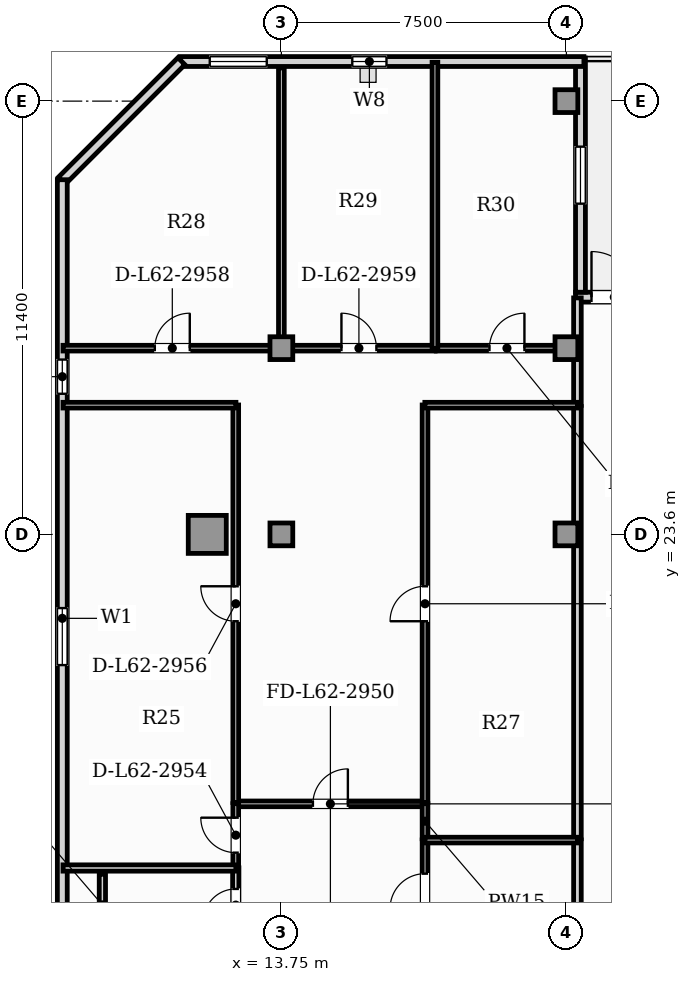
"""IFC4 building model, lengths in metres.
Left out: names, types, materials, properties, quantities, classifications, styles, units other than length and angle.
Written with IfcOpenShell. Run it as: python <this file> out.ifc"""

import sys

from ifc_helpers import new_model, si_unit, direction, frame, frame_2d, origin, origin_2d, place, context, subcontext, project, spatial, rectangle, hollow_rectangle, extrude, element, fill, save


model = new_model("IFC4")
c1 = context("Model", 3, precision=1e-05, world=origin(), true_north=direction((0.0, 1.0)))
c2 = subcontext(c1, "Body", "Model", "MODEL_VIEW")
j1 = project(units=[si_unit("LENGTHUNIT", "METRE"), si_unit("PLANEANGLEUNIT", "RADIAN")], contexts=[c1])
p1 = place(None, origin())
s1 = spatial("IfcSite", under=j1, at=p1, CompositionType="ELEMENT")
p2 = place(p1, origin())
s2 = spatial("IfcBuilding", under=s1, at=p2, CompositionType="ELEMENT")
p3 = place(p2, frame((0.0, 0.0, 251.7)))
s3 = spatial("IfcBuildingStorey", under=s2, at=p3, CompositionType="ELEMENT", Elevation=251.7)
p4 = place(p3, frame((11.8, 23.6, 0.0), z_axis=(0.0, 0.0, 1.0), x_axis=(1.0, 0.0, 0.0)))
e1 = element("IfcColumn", 1, at=p4, inside=s3, PredefinedType="USERDEFINED", context=c2, shape_type="SweptSolid", body=[
    extrude(hollow_rectangle(XDim=1.0, YDim=1.0, WallThickness=0.06, at=origin_2d()), origin(), (0.0, 0.0, 1.0), 5.05),
])
for number, where, z_axis, x_axis in (
    (2, (13.75, 23.6, 0.0), (0.0, 0.0, 1.0), (1.0, 0.0, 0.0)),
    (3, (21.25, 23.6, 0.0), (0.0, 0.0, 1.0), (1.0, 0.0, 0.0)),
    (4, (13.75, 28.5, 0.0), (0.0, 0.0, 1.0), (1.0, 0.0, 0.0)),
    (5, (21.25, 28.5, 0.0), (0.0, 0.0, 1.0), (1.0, 0.0, 0.0)),
    (6, (21.25, 35.0, 0.0), (0.0, 0.0, 1.0), (1.0, 0.0, 0.0)),
):
    element("IfcColumn", number, at=place(p3, frame(where, z_axis=z_axis, x_axis=x_axis)), inside=s3, PredefinedType="COLUMN", context=c2, shape_type="SweptSolid", body=[
        extrude(rectangle(XDim=0.6, YDim=0.6, at=origin_2d()), origin(), (0.0, 0.0, 1.0), 5.05),
    ])
p5 = place(p3, frame((21.49, 29.842, 0.0), z_axis=(0.0, 0.0, 1.0), x_axis=(1.0, 0.0, 0.0)))
e7 = element("IfcWall", 7, at=p5, inside=s3, PredefinedType="SOLIDWALL", context=c2, shape_type="SweptSolid", body=[
    extrude(rectangle(XDim=1.76, YDim=0.26, at=frame_2d((0.88, 0.0))), origin(), (0.0, 0.0, 1.0), 4.85),
])
p6 = place(p5, frame((0.42, 0.0, 0.0)))
e8 = element("IfcOpeningElement", 8, at=p6, cuts=e7, PredefinedType="OPENING", context=c2, shape_type="SweptSolid", body=[
    extrude(rectangle(XDim=1.2, YDim=2.2, at=frame_2d((0.6, 1.1))), frame((0.0, 0.14, 0.0), z_axis=(0.0, -1.0, 0.0), x_axis=(1.0, 0.0, 0.0)), (0.0, 0.0, 1.0), 0.28),
])
p7 = place(p3, frame((21.62, 29.972, 0.0), z_axis=(0.0, 0.0, 1.0), x_axis=(0.0, 1.0, 0.0)))
e9 = element("IfcWall", 9, at=p7, inside=s3, PredefinedType="SOLIDWALL", context=c2, shape_type="SweptSolid", body=[
    extrude(rectangle(XDim=6.16, YDim=0.26, at=frame_2d((3.08, 0.0))), origin(), (0.0, 0.0, 1.0), 4.85),
])
p8 = place(p7, frame((2.33, 0.0, 0.9)))
e10 = element("IfcOpeningElement", 10, at=p8, cuts=e9, PredefinedType="OPENING", context=c2, shape_type="SweptSolid", body=[
    extrude(rectangle(XDim=1.5, YDim=1.95, at=frame_2d((0.75, 0.975))), frame((0.0, 0.14, 0.0), z_axis=(0.0, -1.0, 0.0), x_axis=(1.0, 0.0, 0.0)), (0.0, 0.0, 1.0), 0.28),
])
p9 = place(p3, frame((21.71, 36.042, 0.0), z_axis=(0.0, 0.0, 1.0), x_axis=(-1.0, 0.0, 0.0)))
e11 = element("IfcWall", 11, at=p9, inside=s3, PredefinedType="SOLIDWALL", context=c2, shape_type="SweptSolid", body=[
    extrude(rectangle(XDim=10.615, YDim=0.26, at=frame_2d((5.307, 0.0))), origin(), (0.0, 0.0, 1.0), 4.85),
])
p10 = place(p9, frame((8.344, 0.0, 0.9)))
e12 = element("IfcOpeningElement", 12, at=p10, cuts=e11, PredefinedType="OPENING", context=c2, shape_type="SweptSolid", body=[
    extrude(rectangle(XDim=1.5, YDim=1.95, at=frame_2d((0.75, 0.975))), frame((0.0, 0.14, 0.0), z_axis=(0.0, -1.0, 0.0), x_axis=(1.0, 0.0, 0.0)), (0.0, 0.0, 1.0), 0.28),
])
p11 = place(p9, frame((5.194, 0.0, 0.9)))
e13 = element("IfcOpeningElement", 13, at=p11, cuts=e11, PredefinedType="OPENING", context=c2, shape_type="SweptSolid", body=[
    extrude(rectangle(XDim=0.9, YDim=1.4, at=frame_2d((0.45, 0.7))), frame((0.0, 0.14, 0.0), z_axis=(0.0, -1.0, 0.0), x_axis=(1.0, 0.0, 0.0)), (0.0, 0.0, 1.0), 0.28),
])
p12 = place(p3, frame((11.119, 36.052, 0.0), z_axis=(0.0, 0.0, 1.0), x_axis=(-0.707106781187, -0.707106781187, 0.0)))
e14 = element("IfcWall", 14, at=p12, inside=s3, PredefinedType="SOLIDWALL", context=c2, shape_type="SweptSolid", body=[
    extrude(rectangle(XDim=4.446, YDim=0.26, at=frame_2d((2.223, 0.0))), origin(), (0.0, 0.0, 1.0), 4.85),
])
p13 = place(p3, frame((7.986, 32.932, 0.0), z_axis=(0.0, 0.0, 1.0), x_axis=(0.0, -1.0, 0.0)))
e15 = element("IfcWall", 15, at=p13, inside=s3, PredefinedType="SOLIDWALL", context=c2, shape_type="SweptSolid", body=[
    extrude(rectangle(XDim=29.692, YDim=0.26, at=frame_2d((14.846, 0.0))), origin(), (0.0, 0.0, 1.0), 4.85),
])
p14 = place(p13, frame((23.642, 0.0, 0.85)))
e16 = element("IfcOpeningElement", 16, at=p14, cuts=e15, PredefinedType="OPENING", context=c2, shape_type="SweptSolid", body=[
    extrude(rectangle(XDim=2.4, YDim=2.0, at=frame_2d((1.2, 1.0))), frame((0.0, 0.14, 0.0), z_axis=(0.0, -1.0, 0.0), x_axis=(1.0, 0.0, 0.0)), (0.0, 0.0, 1.0), 0.28),
])
p15 = place(p13, frame((4.732, 0.0, 0.95)))
e17 = element("IfcOpeningElement", 17, at=p15, cuts=e15, PredefinedType="OPENING", context=c2, shape_type="SweptSolid", body=[
    extrude(rectangle(XDim=0.9, YDim=1.5, at=frame_2d((0.45, 0.75))), frame((0.0, 0.14, 0.0), z_axis=(0.0, -1.0, 0.0), x_axis=(1.0, 0.0, 0.0)), (0.0, 0.0, 1.0), 0.28),
])
p16 = place(p13, frame((11.271, 0.0, 0.9)))
e18 = element("IfcOpeningElement", 18, at=p16, cuts=e15, PredefinedType="OPENING", context=c2, shape_type="SweptSolid", body=[
    extrude(rectangle(XDim=1.5, YDim=1.95, at=frame_2d((0.75, 0.975))), frame((0.0, 0.14, 0.0), z_axis=(0.0, -1.0, 0.0), x_axis=(1.0, 0.0, 0.0)), (0.0, 0.0, 1.0), 0.28),
])
p17 = place(p3, frame((21.54, 26.995, 0.0), z_axis=(0.0, 0.0, 1.0), x_axis=(0.0, 1.0, 0.0)))
e19 = element("IfcWall", 19, at=p17, inside=s3, PredefinedType="PARTITIONING", context=c2, shape_type="SweptSolid", body=[
    extrude(rectangle(XDim=2.827, YDim=0.2, at=frame_2d((1.414, 0.0))), origin(), (0.0, 0.0, 1.0), 4.85),
])
p18 = place(p3, frame((21.54, 12.865, 0.0), z_axis=(0.0, 0.0, 1.0), x_axis=(0.0, 1.0, 0.0)))
e20 = element("IfcWall", 20, at=p18, inside=s3, PredefinedType="PARTITIONING", context=c2, shape_type="SweptSolid", body=[
    extrude(rectangle(XDim=2.697, YDim=0.2, at=frame_2d((1.348, 0.0))), origin(), (0.0, 0.0, 1.0), 4.85),
])
p19 = place(p3, frame((21.54, 15.592, 0.0), z_axis=(0.0, 0.0, 1.0), x_axis=(0.0, 1.0, 0.0)))
e21 = element("IfcWall", 21, at=p19, inside=s3, PredefinedType="PARTITIONING", context=c2, shape_type="SweptSolid", body=[
    extrude(rectangle(XDim=11.374, YDim=0.2, at=frame_2d((5.687, 0.0))), origin(), (0.0, 0.0, 1.0), 4.85),
])
p20 = place(p3, frame((12.545, 16.51, 0.0), z_axis=(0.0, 0.0, 1.0), x_axis=(1.0, 0.0, 0.0)))
e22 = element("IfcWall", 22, at=p20, inside=s3, PredefinedType="PARTITIONING", context=c2, shape_type="SweptSolid", body=[
    extrude(rectangle(XDim=4.99, YDim=0.15, at=frame_2d((2.495, 0.0))), origin(), (0.0, 0.0, 1.0), 4.85),
])
p21 = place(p20, frame((2.035, 0.0, 0.0)))
e23 = element("IfcOpeningElement", 23, at=p21, cuts=e22, PredefinedType="OPENING", context=c2, shape_type="SweptSolid", body=[
    extrude(rectangle(XDim=0.92, YDim=2.1, at=frame_2d((0.46, 1.05))), frame((0.0, 0.085, 0.0), z_axis=(0.0, -1.0, 0.0), x_axis=(1.0, 0.0, 0.0)), (0.0, 0.0, 1.0), 0.17),
])
p22 = place(p3, frame((12.55, 12.865, 0.0), z_axis=(0.0, 0.0, 1.0), x_axis=(0.0, 1.0, 0.0)))
e24 = element("IfcWall", 24, at=p22, inside=s3, PredefinedType="PLUMBINGWALL", context=c2, shape_type="SweptSolid", body=[
    extrude(rectangle(XDim=1.962, YDim=0.165, at=frame_2d((0.981, 0.0))), origin(), (0.0, 0.0, 1.0), 4.85),
])
p23 = place(p22, frame((0.556, 0.0, 0.0)))
e25 = element("IfcOpeningElement", 25, at=p23, cuts=e24, PredefinedType="OPENING", context=c2, shape_type="SweptSolid", body=[
    extrude(rectangle(XDim=0.85, YDim=2.1, at=frame_2d((0.425, 1.05))), frame((0.0, 0.093, 0.0), z_axis=(0.0, -1.0, 0.0), x_axis=(1.0, 0.0, 0.0)), (0.0, 0.0, 1.0), 0.185),
])
p24 = place(p3, frame((12.55, 14.857, 0.0), z_axis=(0.0, 0.0, 1.0), x_axis=(0.0, 1.0, 0.0)))
e26 = element("IfcWall", 26, at=p24, inside=s3, PredefinedType="PARTITIONING", context=c2, shape_type="SweptSolid", body=[
    extrude(rectangle(XDim=1.658, YDim=0.15, at=frame_2d((0.829, 0.0))), origin(), (0.0, 0.0, 1.0), 4.85),
])
p25 = place(p24, frame((0.369, 0.0, 0.0)))
e27 = element("IfcOpeningElement", 27, at=p25, cuts=e26, PredefinedType="OPENING", context=c2, shape_type="SweptSolid", body=[
    extrude(rectangle(XDim=0.92, YDim=2.1, at=frame_2d((0.46, 1.05))), frame((0.0, 0.085, 0.0), z_axis=(0.0, -1.0, 0.0), x_axis=(1.0, 0.0, 0.0)), (0.0, 0.0, 1.0), 0.17),
])
p26 = place(p3, frame((17.53, 12.865, 0.0), z_axis=(0.0, 0.0, 1.0), x_axis=(0.0, 1.0, 0.0)))
e28 = element("IfcWall", 28, at=p26, inside=s3, PredefinedType="PARTITIONING", context=c2, shape_type="SweptSolid", body=[
    extrude(rectangle(XDim=2.697, YDim=0.15, at=frame_2d((1.348, 0.0))), origin(), (0.0, 0.0, 1.0), 4.85),
])
p27 = place(p26, frame((0.888, 0.0, 0.0)))
e29 = element("IfcOpeningElement", 29, at=p27, cuts=e28, PredefinedType="OPENING", context=c2, shape_type="SweptSolid", body=[
    extrude(rectangle(XDim=0.92, YDim=2.1, at=frame_2d((0.46, 1.05))), frame((0.0, 0.085, 0.0), z_axis=(0.0, -1.0, 0.0), x_axis=(1.0, 0.0, 0.0)), (0.0, 0.0, 1.0), 0.17),
])
p28 = place(p3, frame((17.53, 15.592, 0.0), z_axis=(0.0, 0.0, 1.0), x_axis=(0.0, 1.0, 0.0)))
e30 = element("IfcWall", 30, at=p28, inside=s3, PredefinedType="PARTITIONING", context=c2, shape_type="SweptSolid", body=[
    extrude(rectangle(XDim=0.923, YDim=0.15, at=frame_2d((0.462, 0.0))), origin(), (0.0, 0.0, 1.0), 4.85),
])
p29 = place(p3, frame((12.55, 16.545, 0.0), z_axis=(0.0, 0.0, 1.0), x_axis=(0.0, 1.0, 0.0)))
e31 = element("IfcWall", 31, at=p29, inside=s3, PredefinedType="PARTITIONING", context=c2, shape_type="SweptSolid", body=[
    extrude(rectangle(XDim=10.46, YDim=0.15, at=frame_2d((5.23, 0.0))), origin(), (0.0, 0.0, 1.0), 4.85),
])
p30 = place(p29, frame((4.77, 0.0, 0.0)))
e32 = element("IfcOpeningElement", 32, at=p30, cuts=e31, PredefinedType="OPENING", context=c2, shape_type="SweptSolid", body=[
    extrude(rectangle(XDim=0.92, YDim=2.1, at=frame_2d((0.46, 1.05))), frame((0.0, 0.085, 0.0), z_axis=(0.0, -1.0, 0.0), x_axis=(1.0, 0.0, 0.0)), (0.0, 0.0, 1.0), 0.17),
])
p31 = place(p3, frame((8.005, 27.0, 0.0), z_axis=(0.0, 0.0, 1.0), x_axis=(1.0, 0.0, 0.0)))
e33 = element("IfcWall", 33, at=p31, inside=s3, PredefinedType="PARTITIONING", context=c2, shape_type="SweptSolid", body=[
    extrude(rectangle(XDim=4.55, YDim=0.15, at=frame_2d((2.275, 0.0))), origin(), (0.0, 0.0, 1.0), 4.85),
])
p32 = place(p3, frame((17.53, 16.545, 0.0), z_axis=(0.0, 0.0, 1.0), x_axis=(0.0, 1.0, 0.0)))
e34 = element("IfcWall", 34, at=p32, inside=s3, PredefinedType="PARTITIONING", context=c2, shape_type="SweptSolid", body=[
    extrude(rectangle(XDim=10.46, YDim=0.15, at=frame_2d((5.23, 0.0))), origin(), (0.0, 0.0, 1.0), 4.85),
])
p33 = place(p32, frame((4.77, 0.0, 0.0)))
e35 = element("IfcOpeningElement", 35, at=p33, cuts=e34, PredefinedType="OPENING", context=c2, shape_type="SweptSolid", body=[
    extrude(rectangle(XDim=0.92, YDim=2.1, at=frame_2d((0.46, 1.05))), frame((0.0, 0.085, 0.0), z_axis=(0.0, -1.0, 0.0), x_axis=(1.0, 0.0, 0.0)), (0.0, 0.0, 1.0), 0.17),
])
p34 = place(p3, frame((17.525, 27.0, 0.0), z_axis=(0.0, 0.0, 1.0), x_axis=(1.0, 0.0, 0.0)))
e36 = element("IfcWall", 36, at=p34, inside=s3, PredefinedType="PARTITIONING", context=c2, shape_type="SweptSolid", body=[
    extrude(rectangle(XDim=4.02, YDim=0.15, at=frame_2d((2.01, 0.0))), origin(), (0.0, 0.0, 1.0), 4.85),
])
p35 = place(p3, frame((8.005, 28.5, 0.0), z_axis=(0.0, 0.0, 1.0), x_axis=(1.0, 0.0, 0.0)))
e37 = element("IfcWall", 37, at=p35, inside=s3, PredefinedType="PARTITIONING", context=c2, shape_type="SweptSolid", body=[
    extrude(rectangle(XDim=5.75, YDim=0.15, at=frame_2d((2.875, 0.0))), origin(), (0.0, 0.0, 1.0), 4.85),
])
p36 = place(p35, frame((2.415, 0.0, 0.0)))
e38 = element("IfcOpeningElement", 38, at=p36, cuts=e37, PredefinedType="OPENING", context=c2, shape_type="SweptSolid", body=[
    extrude(rectangle(XDim=0.92, YDim=2.1, at=frame_2d((0.46, 1.05))), frame((0.0, 0.085, 0.0), z_axis=(0.0, -1.0, 0.0), x_axis=(1.0, 0.0, 0.0)), (0.0, 0.0, 1.0), 0.17),
])
p37 = place(p3, frame((13.785, 28.5, 0.0), z_axis=(0.0, 0.0, 1.0), x_axis=(1.0, 0.0, 0.0)))
e39 = element("IfcWall", 39, at=p37, inside=s3, PredefinedType="PARTITIONING", context=c2, shape_type="SweptSolid", body=[
    extrude(rectangle(XDim=4.011, YDim=0.15, at=frame_2d((2.005, 0.0))), origin(), (0.0, 0.0, 1.0), 4.306),
])
p38 = place(p37, frame((1.545, 0.0, 0.0)))
e40 = element("IfcOpeningElement", 40, at=p38, cuts=e39, PredefinedType="OPENING", context=c2, shape_type="SweptSolid", body=[
    extrude(rectangle(XDim=0.92, YDim=2.1, at=frame_2d((0.46, 1.05))), frame((0.0, 0.085, 0.0), z_axis=(0.0, -1.0, 0.0), x_axis=(1.0, 0.0, 0.0)), (0.0, 0.0, 1.0), 0.17),
])
p39 = place(p3, frame((17.826, 28.5, 0.0), z_axis=(0.0, 0.0, 1.0), x_axis=(1.0, 0.0, 0.0)))
e41 = element("IfcWall", 41, at=p39, inside=s3, PredefinedType="PARTITIONING", context=c2, shape_type="SweptSolid", body=[
    extrude(rectangle(XDim=3.719, YDim=0.15, at=frame_2d((1.86, 0.0))), origin(), (0.0, 0.0, 1.0), 4.306),
])
p40 = place(p39, frame((1.4, 0.0, 0.0)))
e42 = element("IfcOpeningElement", 42, at=p40, cuts=e41, PredefinedType="OPENING", context=c2, shape_type="SweptSolid", body=[
    extrude(rectangle(XDim=0.92, YDim=2.1, at=frame_2d((0.46, 1.05))), frame((0.0, 0.085, 0.0), z_axis=(0.0, -1.0, 0.0), x_axis=(1.0, 0.0, 0.0)), (0.0, 0.0, 1.0), 0.17),
])
p41 = place(p3, frame((8.005, 14.822, 0.0), z_axis=(0.0, 0.0, 1.0), x_axis=(1.0, 0.0, 0.0)))
e43 = element("IfcWall", 43, at=p41, inside=s3, PredefinedType="PLUMBINGWALL", context=c2, shape_type="SweptSolid", body=[
    extrude(rectangle(XDim=4.55, YDim=0.165, at=frame_2d((2.275, 0.0))), origin(), (0.0, 0.0, 1.0), 4.85),
])
p42 = place(p3, frame((17.525, 15.556, 0.0), z_axis=(0.0, 0.0, 1.0), x_axis=(1.0, 0.0, 0.0)))
e44 = element("IfcWall", 44, at=p42, inside=s3, PredefinedType="PARTITIONING", context=c2, shape_type="SweptSolid", body=[
    extrude(rectangle(XDim=4.02, YDim=0.15, at=frame_2d((2.01, 0.0))), origin(), (0.0, 0.0, 1.0), 4.85),
])
p43 = place(p3, frame((13.75, 28.495, 0.0), z_axis=(0.0, 0.0, 1.0), x_axis=(0.0, 1.0, 0.0)))
e45 = element("IfcWall", 45, at=p43, inside=s3, PredefinedType="PARTITIONING", context=c2, shape_type="SweptSolid", body=[
    extrude(rectangle(XDim=7.378, YDim=0.15, at=frame_2d((3.689, 0.0))), origin(), (0.0, 0.0, 1.0), 4.85),
])
p44 = place(p3, frame((17.791, 28.495, 0.0), z_axis=(0.0, 0.0, 1.0), x_axis=(0.0, 1.0, 0.0)))
e46 = element("IfcWall", 46, at=p44, inside=s3, PredefinedType="PARTITIONING", context=c2, shape_type="SweptSolid", body=[
    extrude(rectangle(XDim=7.527, YDim=0.15, at=frame_2d((3.764, 0.0))), origin(), (0.0, 0.0, 1.0), 4.85),
])
p45 = place(p3, frame((9.04, 13.045, 0.0), z_axis=(0.0, 0.0, 1.0), x_axis=(0.0, 1.0, 0.0)))
e47 = element("IfcWall", 47, at=p45, inside=s3, PredefinedType="PLUMBINGWALL", context=c2, shape_type="SweptSolid", body=[
    extrude(rectangle(XDim=1.612, YDim=0.165, at=frame_2d((0.806, 0.0))), origin(), (0.0, 0.0, 1.0), 4.85),
])
p46 = place(p6, origin())
e48 = element("IfcDoor", 48, at=p46, inside=s3, OperationType="SINGLE_SWING_LEFT", PredefinedType="DOOR", context=c2, shape_type="SweptSolid", body=[
    extrude(rectangle(XDim=1.2, YDim=2.2, at=frame_2d((0.6, 1.1))), frame((0.0, 0.025, 0.0), z_axis=(0.0, -1.0, 0.0), x_axis=(1.0, 0.0, 0.0)), (0.0, 0.0, 1.0), 0.05),
])
fill(e8, e48)
p47 = place(p15, origin())
e49 = element("IfcWindow", 49, at=p47, inside=s3, PartitioningType="SINGLE_PANEL", PredefinedType="WINDOW", context=c2, shape_type="SweptSolid", body=[
    extrude(rectangle(XDim=0.9, YDim=1.5, at=frame_2d((0.45, 0.75))), frame((0.0, 0.03, 0.0), z_axis=(0.0, -1.0, 0.0), x_axis=(1.0, 0.0, 0.0)), (0.0, 0.0, 1.0), 0.06),
])
fill(e17, e49)
p48 = place(p16, origin())
e50 = element("IfcWindow", 50, at=p48, inside=s3, PartitioningType="SINGLE_PANEL", PredefinedType="WINDOW", context=c2, shape_type="SweptSolid", body=[
    extrude(rectangle(XDim=1.5, YDim=1.95, at=frame_2d((0.75, 0.975))), frame((0.0, 0.03, 0.0), z_axis=(0.0, -1.0, 0.0), x_axis=(1.0, 0.0, 0.0)), (0.0, 0.0, 1.0), 0.06),
])
fill(e18, e50)
p49 = place(p10, origin())
e51 = element("IfcWindow", 51, at=p49, inside=s3, PartitioningType="SINGLE_PANEL", PredefinedType="WINDOW", context=c2, shape_type="SweptSolid", body=[
    extrude(rectangle(XDim=1.5, YDim=1.95, at=frame_2d((0.75, 0.975))), frame((0.0, 0.03, 0.0), z_axis=(0.0, -1.0, 0.0), x_axis=(1.0, 0.0, 0.0)), (0.0, 0.0, 1.0), 0.06),
])
fill(e12, e51)
p50 = place(p11, origin())
e52 = element("IfcWindow", 52, at=p50, inside=s3, PartitioningType="SINGLE_PANEL", PredefinedType="WINDOW", context=c2, shape_type="SweptSolid", body=[
    extrude(rectangle(XDim=0.9, YDim=1.4, at=frame_2d((0.45, 0.7))), frame((0.0, 0.03, 0.0), z_axis=(0.0, -1.0, 0.0), x_axis=(1.0, 0.0, 0.0)), (0.0, 0.0, 1.0), 0.06),
])
fill(e13, e52)
p51 = place(p8, origin())
e53 = element("IfcWindow", 53, at=p51, inside=s3, PartitioningType="SINGLE_PANEL", PredefinedType="WINDOW", context=c2, shape_type="SweptSolid", body=[
    extrude(rectangle(XDim=1.5, YDim=1.95, at=frame_2d((0.75, 0.975))), frame((0.0, 0.03, 0.0), z_axis=(0.0, -1.0, 0.0), x_axis=(1.0, 0.0, 0.0)), (0.0, 0.0, 1.0), 0.06),
])
fill(e10, e53)
p52 = place(p21, origin())
e54 = element("IfcDoor", 54, at=p52, inside=s3, OperationType="SINGLE_SWING_RIGHT", PredefinedType="DOOR", context=c2, shape_type="SweptSolid", body=[
    extrude(rectangle(XDim=0.92, YDim=2.1, at=frame_2d((0.46, 1.05))), frame((0.0, 0.025, 0.0), z_axis=(0.0, -1.0, 0.0), x_axis=(1.0, 0.0, 0.0)), (0.0, 0.0, 1.0), 0.05),
])
fill(e23, e54)
p53 = place(p23, origin())
e55 = element("IfcDoor", 55, at=p53, inside=s3, OperationType="SINGLE_SWING_LEFT", PredefinedType="DOOR", context=c2, shape_type="SweptSolid", body=[
    extrude(rectangle(XDim=0.85, YDim=2.1, at=frame_2d((0.425, 1.05))), frame((0.0, 0.025, 0.0), z_axis=(0.0, -1.0, 0.0), x_axis=(1.0, 0.0, 0.0)), (0.0, 0.0, 1.0), 0.05),
])
fill(e25, e55)
p54 = place(p25, origin())
e56 = element("IfcDoor", 56, at=p54, inside=s3, OperationType="SINGLE_SWING_RIGHT", PredefinedType="DOOR", context=c2, shape_type="SweptSolid", body=[
    extrude(rectangle(XDim=0.92, YDim=2.1, at=frame_2d((0.46, 1.05))), frame((0.0, 0.025, 0.0), z_axis=(0.0, -1.0, 0.0), x_axis=(1.0, 0.0, 0.0)), (0.0, 0.0, 1.0), 0.05),
])
fill(e27, e56)
p55 = place(p27, origin())
e57 = element("IfcDoor", 57, at=p55, inside=s3, OperationType="SINGLE_SWING_LEFT", PredefinedType="DOOR", context=c2, shape_type="SweptSolid", body=[
    extrude(rectangle(XDim=0.92, YDim=2.1, at=frame_2d((0.46, 1.05))), frame((0.0, 0.025, 0.0), z_axis=(0.0, -1.0, 0.0), x_axis=(1.0, 0.0, 0.0)), (0.0, 0.0, 1.0), 0.05),
])
fill(e29, e57)
p56 = place(p30, origin())
e58 = element("IfcDoor", 58, at=p56, inside=s3, OperationType="SINGLE_SWING_RIGHT", PredefinedType="DOOR", context=c2, shape_type="SweptSolid", body=[
    extrude(rectangle(XDim=0.92, YDim=2.1, at=frame_2d((0.46, 1.05))), frame((0.0, 0.025, 0.0), z_axis=(0.0, -1.0, 0.0), x_axis=(1.0, 0.0, 0.0)), (0.0, 0.0, 1.0), 0.05),
])
fill(e32, e58)
p57 = place(p33, origin())
e59 = element("IfcDoor", 59, at=p57, inside=s3, OperationType="SINGLE_SWING_LEFT", PredefinedType="DOOR", context=c2, shape_type="SweptSolid", body=[
    extrude(rectangle(XDim=0.92, YDim=2.1, at=frame_2d((0.46, 1.05))), frame((0.0, 0.025, 0.0), z_axis=(0.0, -1.0, 0.0), x_axis=(1.0, 0.0, 0.0)), (0.0, 0.0, 1.0), 0.05),
])
fill(e35, e59)
p58 = place(p36, origin())
e60 = element("IfcDoor", 60, at=p58, inside=s3, OperationType="SINGLE_SWING_RIGHT", PredefinedType="DOOR", context=c2, shape_type="SweptSolid", body=[
    extrude(rectangle(XDim=0.92, YDim=2.1, at=frame_2d((0.46, 1.05))), frame((0.0, 0.025, 0.0), z_axis=(0.0, -1.0, 0.0), x_axis=(1.0, 0.0, 0.0)), (0.0, 0.0, 1.0), 0.05),
])
fill(e38, e60)
p59 = place(p38, origin())
e61 = element("IfcDoor", 61, at=p59, inside=s3, OperationType="SINGLE_SWING_LEFT", PredefinedType="DOOR", context=c2, shape_type="SweptSolid", body=[
    extrude(rectangle(XDim=0.92, YDim=2.1, at=frame_2d((0.46, 1.05))), frame((0.0, 0.025, 0.0), z_axis=(0.0, -1.0, 0.0), x_axis=(1.0, 0.0, 0.0)), (0.0, 0.0, 1.0), 0.05),
])
fill(e40, e61)
p60 = place(p40, origin())
e62 = element("IfcDoor", 62, at=p60, inside=s3, OperationType="SINGLE_SWING_RIGHT", PredefinedType="DOOR", context=c2, shape_type="SweptSolid", body=[
    extrude(rectangle(XDim=0.92, YDim=2.1, at=frame_2d((0.46, 1.05))), frame((0.0, 0.025, 0.0), z_axis=(0.0, -1.0, 0.0), x_axis=(1.0, 0.0, 0.0)), (0.0, 0.0, 1.0), 0.05),
])
fill(e42, e62)
save(model, sys.argv[1])
